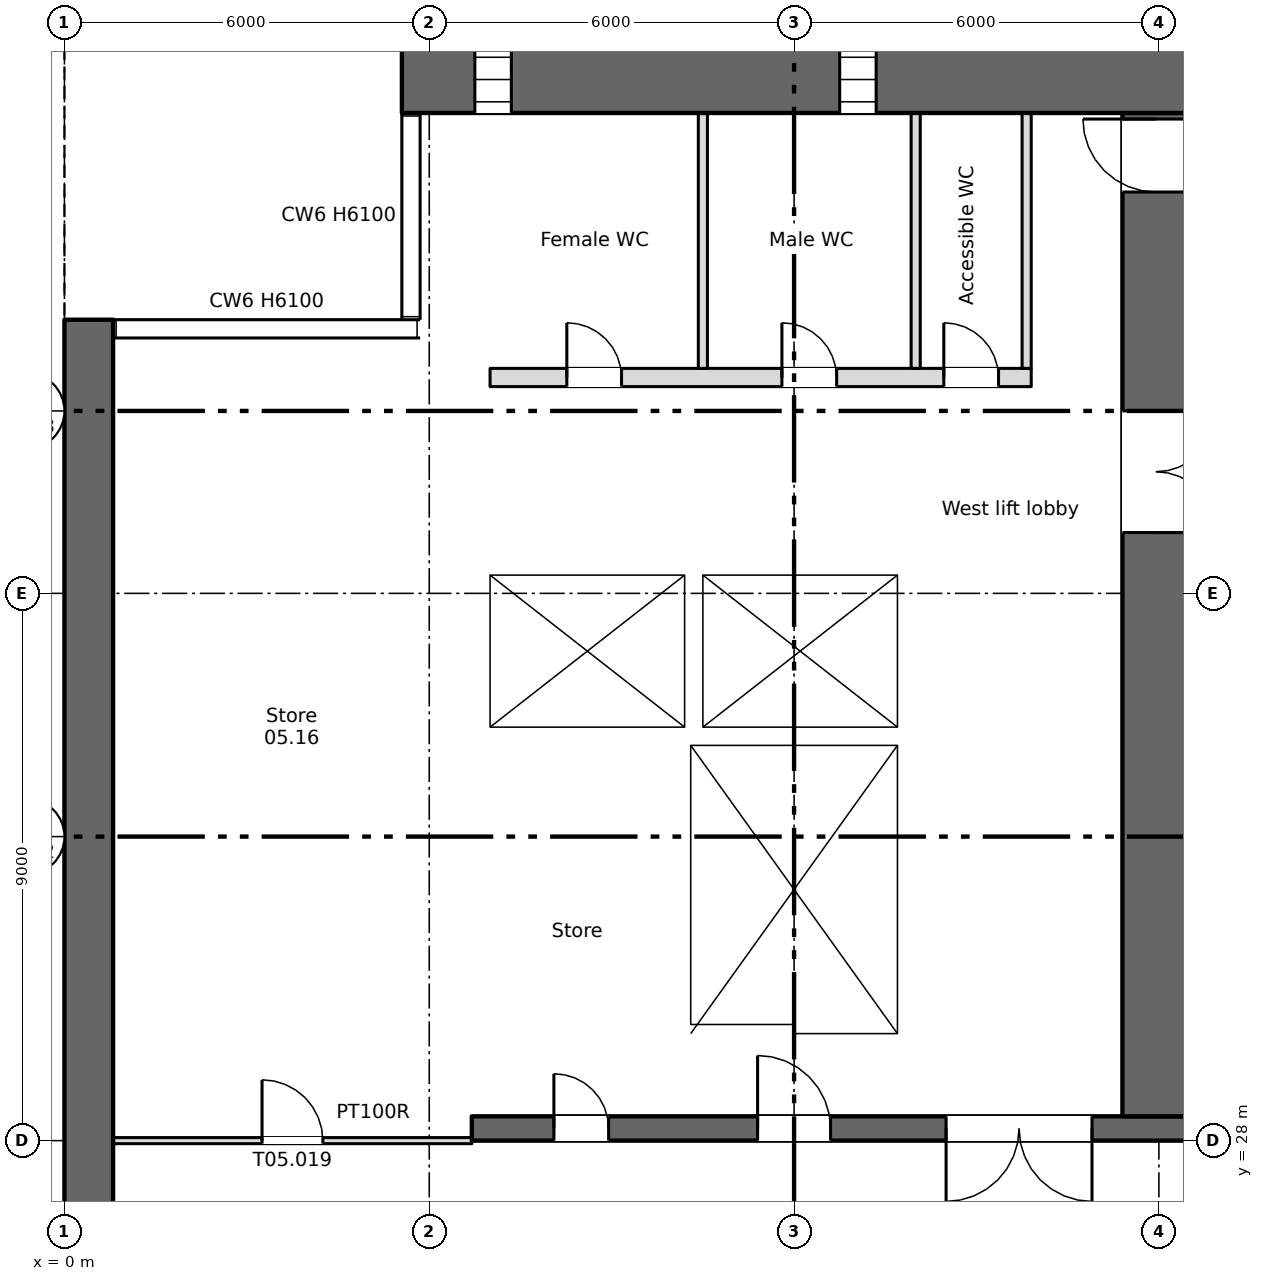
"""IFC4 building model, lengths in metres.
Left out: names, types, materials, properties, quantities, classifications, styles, units other than length and angle.
Written with IfcOpenShell. Run it as: python <this file> out.ifc"""

import sys

from ifc_helpers import new_model, si_unit, direction, frame, frame_2d, origin, place, context, subcontext, project, spatial, rectangle, extrude, element, fill, save


model = new_model("IFC4")
c1 = context("Model", 3, precision=1e-05, world=origin(), true_north=direction((0.0, 1.0)))
c2 = subcontext(c1, "Body", "Model", "MODEL_VIEW")
j1 = project(units=[si_unit("LENGTHUNIT", "METRE"), si_unit("PLANEANGLEUNIT", "RADIAN")], contexts=[c1])
p1 = place(None, origin())
s1 = spatial("IfcSite", under=j1, at=p1, CompositionType="ELEMENT")
p2 = place(p1, origin())
s2 = spatial("IfcBuilding", under=s1, at=p2, CompositionType="ELEMENT")
p3 = place(p2, frame((0.0, 0.0, 11.3)))
s3 = spatial("IfcBuildingStorey", under=s2, at=p3, CompositionType="ELEMENT", Elevation=11.3)
p4 = place(p3, frame((0.4, 4.5, 0.0), z_axis=(0.0, 0.0, 1.0), x_axis=(0.0, 1.0, 0.0)))
e1 = element("IfcWall", 1, at=p4, inside=s3, PredefinedType="SHEAR", context=c2, shape_type="SweptSolid", body=[
    extrude(rectangle(XDim=37.0, YDim=0.8, at=frame_2d((18.5, 0.0))), origin(), (0.0, 0.0, 1.0), 6.1),
])
p5 = place(p3, frame((5.55, 45.45, 0.0), z_axis=(0.0, 0.0, 1.0), x_axis=(1.0, 0.0, 0.0)))
e2 = element("IfcWall", 2, at=p5, inside=s3, PredefinedType="SHEAR", context=c2, shape_type="SweptSolid", body=[
    extrude(rectangle(XDim=66.9, YDim=1.1, at=frame_2d((33.45, 0.0))), origin(), (0.0, 0.0, 1.0), 6.1),
])
p6 = place(p5, frame((1.2, 0.0, 0.6)))
e3 = element("IfcOpeningElement", 3, at=p6, cuts=e2, PredefinedType="OPENING", context=c2, shape_type="SweptSolid", body=[
    extrude(rectangle(XDim=0.6, YDim=2.7, at=frame_2d((0.3, 1.35))), frame((0.0, 0.56, 0.0), z_axis=(0.0, -1.0, 0.0), x_axis=(1.0, 0.0, 0.0)), (0.0, 0.0, 1.0), 1.12),
])
p7 = place(p5, frame((7.2, 0.0, 0.6)))
e4 = element("IfcOpeningElement", 4, at=p7, cuts=e2, PredefinedType="OPENING", context=c2, shape_type="SweptSolid", body=[
    extrude(rectangle(XDim=0.6, YDim=2.7, at=frame_2d((0.3, 1.35))), frame((0.0, 0.56, 0.0), z_axis=(0.0, -1.0, 0.0), x_axis=(1.0, 0.0, 0.0)), (0.0, 0.0, 1.0), 1.12),
])
p8 = place(p5, frame((61.2, 0.0, 0.6)))
e5 = element("IfcOpeningElement", 5, at=p8, cuts=e2, PredefinedType="OPENING", context=c2, shape_type="SweptSolid", body=[
    extrude(rectangle(XDim=0.6, YDim=2.7, at=frame_2d((0.3, 1.35))), frame((0.0, 0.56, 0.0), z_axis=(0.0, -1.0, 0.0), x_axis=(1.0, 0.0, 0.0)), (0.0, 0.0, 1.0), 1.12),
])
p9 = place(p3, frame((6.7, 28.2, 0.0), z_axis=(0.0, 0.0, 1.0), x_axis=(1.0, 0.0, 0.0)))
e6 = element("IfcWall", 6, at=p9, inside=s3, PredefinedType="SHEAR", context=c2, shape_type="SweptSolid", body=[
    extrude(rectangle(XDim=66.3, YDim=0.4, at=frame_2d((33.15, 0.0))), origin(), (0.0, 0.0, 1.0), 6.1),
])
p10 = place(p9, frame((13.85, 0.0, 0.0)))
e7 = element("IfcOpeningElement", 7, at=p10, cuts=e6, PredefinedType="OPENING", context=c2, shape_type="SweptSolid", body=[
    extrude(rectangle(XDim=0.9, YDim=2.1, at=frame_2d((0.45, 1.05))), frame((0.0, 0.21, 0.0), z_axis=(0.0, -1.0, 0.0), x_axis=(1.0, 0.0, 0.0)), (0.0, 0.0, 1.0), 0.42),
])
p11 = place(p9, frame((48.562, 0.0, 0.0)))
e8 = element("IfcOpeningElement", 8, at=p11, cuts=e6, PredefinedType="OPENING", context=c2, shape_type="SweptSolid", body=[
    extrude(rectangle(XDim=0.9, YDim=2.1, at=frame_2d((0.45, 1.05))), frame((0.0, 0.21, 0.0), z_axis=(0.0, -1.0, 0.0), x_axis=(1.0, 0.0, 0.0)), (0.0, 0.0, 1.0), 0.42),
])
p12 = place(p9, frame((51.137, 0.0, 0.0)))
e9 = element("IfcOpeningElement", 9, at=p12, cuts=e6, PredefinedType="OPENING", context=c2, shape_type="SweptSolid", body=[
    extrude(rectangle(XDim=0.9, YDim=2.1, at=frame_2d((0.45, 1.05))), frame((0.0, 0.21, 0.0), z_axis=(0.0, -1.0, 0.0), x_axis=(1.0, 0.0, 0.0)), (0.0, 0.0, 1.0), 0.42),
])
p13 = place(p9, frame((1.35, 0.0, 0.0)))
e10 = element("IfcOpeningElement", 10, at=p13, cuts=e6, PredefinedType="OPENING", context=c2, shape_type="SweptSolid", body=[
    extrude(rectangle(XDim=0.9, YDim=2.1, at=frame_2d((0.45, 1.05))), frame((0.0, 0.21, 0.0), z_axis=(0.0, -1.0, 0.0), x_axis=(1.0, 0.0, 0.0)), (0.0, 0.0, 1.0), 0.42),
])
p14 = place(p9, frame((59.363, 0.0, 0.0)))
e11 = element("IfcOpeningElement", 11, at=p14, cuts=e6, PredefinedType="OPENING", context=c2, shape_type="SweptSolid", body=[
    extrude(rectangle(XDim=0.9, YDim=2.1, at=frame_2d((0.45, 1.05))), frame((0.0, 0.21, 0.0), z_axis=(0.0, -1.0, 0.0), x_axis=(1.0, 0.0, 0.0)), (0.0, 0.0, 1.0), 0.42),
])
p15 = place(p9, frame((63.538, 0.0, 0.0)))
e12 = element("IfcOpeningElement", 12, at=p15, cuts=e6, PredefinedType="OPENING", context=c2, shape_type="SweptSolid", body=[
    extrude(rectangle(XDim=0.9, YDim=2.1, at=frame_2d((0.45, 1.05))), frame((0.0, 0.21, 0.0), z_axis=(0.0, -1.0, 0.0), x_axis=(1.0, 0.0, 0.0)), (0.0, 0.0, 1.0), 0.42),
])
p16 = place(p9, frame((4.7, 0.0, 0.0)))
e13 = element("IfcOpeningElement", 13, at=p16, cuts=e6, PredefinedType="OPENING", context=c2, shape_type="SweptSolid", body=[
    extrude(rectangle(XDim=1.2, YDim=2.1, at=frame_2d((0.6, 1.05))), frame((0.0, 0.21, 0.0), z_axis=(0.0, -1.0, 0.0), x_axis=(1.0, 0.0, 0.0)), (0.0, 0.0, 1.0), 0.42),
])
p17 = place(p9, frame((31.7, 0.0, 0.0)))
e14 = element("IfcOpeningElement", 14, at=p17, cuts=e6, PredefinedType="OPENING", context=c2, shape_type="SweptSolid", body=[
    extrude(rectangle(XDim=1.2, YDim=2.1, at=frame_2d((0.6, 1.05))), frame((0.0, 0.21, 0.0), z_axis=(0.0, -1.0, 0.0), x_axis=(1.0, 0.0, 0.0)), (0.0, 0.0, 1.0), 0.42),
])
p18 = place(p9, frame((55.2, 0.0, 0.0)))
e15 = element("IfcOpeningElement", 15, at=p18, cuts=e6, PredefinedType="OPENING", context=c2, shape_type="SweptSolid", body=[
    extrude(rectangle(XDim=1.2, YDim=2.1, at=frame_2d((0.6, 1.05))), frame((0.0, 0.21, 0.0), z_axis=(0.0, -1.0, 0.0), x_axis=(1.0, 0.0, 0.0)), (0.0, 0.0, 1.0), 0.42),
])
p19 = place(p9, frame((21.7, 0.0, 0.0)))
e16 = element("IfcOpeningElement", 16, at=p19, cuts=e6, PredefinedType="OPENING", context=c2, shape_type="SweptSolid", body=[
    extrude(rectangle(XDim=1.2, YDim=2.1, at=frame_2d((0.6, 1.05))), frame((0.0, 0.21, 0.0), z_axis=(0.0, -1.0, 0.0), x_axis=(1.0, 0.0, 0.0)), (0.0, 0.0, 1.0), 0.42),
])
p20 = place(p9, frame((41.7, 0.0, 0.0)))
e17 = element("IfcOpeningElement", 17, at=p20, cuts=e6, PredefinedType="OPENING", context=c2, shape_type="SweptSolid", body=[
    extrude(rectangle(XDim=1.2, YDim=2.1, at=frame_2d((0.6, 1.05))), frame((0.0, 0.21, 0.0), z_axis=(0.0, -1.0, 0.0), x_axis=(1.0, 0.0, 0.0)), (0.0, 0.0, 1.0), 0.42),
])
p21 = place(p9, frame((24.85, 0.0, 0.0)))
e18 = element("IfcOpeningElement", 18, at=p21, cuts=e6, PredefinedType="OPENING", context=c2, shape_type="SweptSolid", body=[
    extrude(rectangle(XDim=2.4, YDim=2.1, at=frame_2d((1.2, 1.05))), frame((0.0, 0.21, 0.0), z_axis=(0.0, -1.0, 0.0), x_axis=(1.0, 0.0, 0.0)), (0.0, 0.0, 1.0), 0.42),
])
p22 = place(p9, frame((37.35, 0.0, 0.0)))
e19 = element("IfcOpeningElement", 19, at=p22, cuts=e6, PredefinedType="OPENING", context=c2, shape_type="SweptSolid", body=[
    extrude(rectangle(XDim=2.4, YDim=2.1, at=frame_2d((1.2, 1.05))), frame((0.0, 0.21, 0.0), z_axis=(0.0, -1.0, 0.0), x_axis=(1.0, 0.0, 0.0)), (0.0, 0.0, 1.0), 0.42),
])
p23 = place(p9, frame((7.8, 0.0, 0.0)))
e20 = element("IfcOpeningElement", 20, at=p23, cuts=e6, PredefinedType="OPENING", context=c2, shape_type="SweptSolid", body=[
    extrude(rectangle(XDim=2.4, YDim=2.1, at=frame_2d((1.2, 1.05))), frame((0.0, 0.21, 0.0), z_axis=(0.0, -1.0, 0.0), x_axis=(1.0, 0.0, 0.0)), (0.0, 0.0, 1.0), 0.42),
])
p24 = place(p9, frame((28.85, 0.0, 0.0)))
e21 = element("IfcOpeningElement", 21, at=p24, cuts=e6, PredefinedType="OPENING", context=c2, shape_type="SweptSolid", body=[
    extrude(rectangle(XDim=0.9, YDim=2.1, at=frame_2d((0.45, 1.05))), frame((0.0, 0.21, 0.0), z_axis=(0.0, -1.0, 0.0), x_axis=(1.0, 0.0, 0.0)), (0.0, 0.0, 1.0), 0.42),
])
p25 = place(p9, frame((34.85, 0.0, 0.0)))
e22 = element("IfcOpeningElement", 22, at=p25, cuts=e6, PredefinedType="OPENING", context=c2, shape_type="SweptSolid", body=[
    extrude(rectangle(XDim=0.9, YDim=2.1, at=frame_2d((0.45, 1.05))), frame((0.0, 0.21, 0.0), z_axis=(0.0, -1.0, 0.0), x_axis=(1.0, 0.0, 0.0)), (0.0, 0.0, 1.0), 0.42),
])
p26 = place(p3, frame((6.85, 28.4, 0.0), z_axis=(0.0, 0.0, 1.0), x_axis=(0.0, 1.0, 0.0)))
e23 = element("IfcWall", 23, at=p26, inside=s3, PredefinedType="SHEAR", context=c2, shape_type="SweptSolid", body=[
    extrude(rectangle(XDim=16.5, YDim=0.3, at=frame_2d((8.25, 0.0))), origin(), (0.0, 0.0, 1.0), 6.1),
])
p27 = place(p3, frame((17.95, 28.4, 0.0), z_axis=(0.0, 0.0, 1.0), x_axis=(0.0, 1.0, 0.0)))
e24 = element("IfcWall", 24, at=p27, inside=s3, PredefinedType="SHEAR", context=c2, shape_type="SweptSolid", body=[
    extrude(rectangle(XDim=16.5, YDim=1.1, at=frame_2d((8.25, 0.0))), origin(), (0.0, 0.0, 1.0), 6.1),
])
p28 = place(p27, frame((9.6, 0.0, 0.0)))
e25 = element("IfcOpeningElement", 25, at=p28, cuts=e24, PredefinedType="OPENING", context=c2, shape_type="SweptSolid", body=[
    extrude(rectangle(XDim=2.0, YDim=2.1, at=frame_2d((1.0, 1.05))), frame((0.0, 0.56, 0.0), z_axis=(0.0, -1.0, 0.0), x_axis=(1.0, 0.0, 0.0)), (0.0, 0.0, 1.0), 1.12),
])
p29 = place(p27, frame((15.2, 0.0, 0.0)))
e26 = element("IfcOpeningElement", 26, at=p29, cuts=e24, PredefinedType="OPENING", context=c2, shape_type="SweptSolid", body=[
    extrude(rectangle(XDim=1.2, YDim=2.1, at=frame_2d((0.6, 1.05))), frame((0.0, 0.56, 0.0), z_axis=(0.0, -1.0, 0.0), x_axis=(1.0, 0.0, 0.0)), (0.0, 0.0, 1.0), 1.12),
])
for number, where, z_axis, x_axis in (
    (27, (10.15, 28.4, 0.0), (0.0, 0.0, 1.0), (0.0, 1.0, 0.0)),
    (28, (13.85, 28.4, 0.0), (0.0, 0.0, 1.0), (0.0, 1.0, 0.0)),
):
    element("IfcWall", number, at=place(p3, frame(where, z_axis=z_axis, x_axis=x_axis)), inside=s3, PredefinedType="SHEAR", context=c2, shape_type="SweptSolid", body=[
        extrude(rectangle(XDim=6.1, YDim=0.3, at=frame_2d((3.05, 0.0))), origin(), (0.0, 0.0, 1.0), 6.1),
    ])
for number, where, z_axis, x_axis in (
    (29, (7.0, 34.65, 0.0), (0.0, 0.0, 1.0), (1.0, 0.0, 0.0)),
    (30, (7.0, 37.45, 0.0), (0.0, 0.0, 1.0), (1.0, 0.0, 0.0)),
):
    element("IfcWall", number, at=place(p3, frame(where, z_axis=z_axis, x_axis=x_axis)), inside=s3, PredefinedType="SHEAR", context=c2, shape_type="SweptSolid", body=[
        extrude(rectangle(XDim=7.0, YDim=0.3, at=frame_2d((3.5, 0.0))), origin(), (0.0, 0.0, 1.0), 6.1),
    ])
p30 = place(p3, frame((13.85, 34.8, 0.0), z_axis=(0.0, 0.0, 1.0), x_axis=(0.0, 1.0, 0.0)))
e31 = element("IfcWall", 31, at=p30, inside=s3, PredefinedType="SHEAR", context=c2, shape_type="SweptSolid", body=[
    extrude(rectangle(XDim=2.5, YDim=0.3, at=frame_2d((1.25, 0.0))), origin(), (0.0, 0.0, 1.0), 6.1),
])
p31 = place(p3, frame((7.0, 40.55, 0.0), z_axis=(0.0, 0.0, 1.0), x_axis=(1.0, 0.0, 0.0)))
e32 = element("IfcWall", 32, at=p31, inside=s3, PredefinedType="PARTITIONING", context=c2, shape_type="SweptSolid", body=[
    extrude(rectangle(XDim=8.9, YDim=0.3, at=frame_2d((4.45, 0.0))), origin(), (0.0, 0.0, 1.0), 6.1),
])
p32 = place(p31, frame((1.262, 0.0, 0.0)))
e33 = element("IfcOpeningElement", 33, at=p32, cuts=e32, PredefinedType="OPENING", context=c2, shape_type="SweptSolid", body=[
    extrude(rectangle(XDim=0.9, YDim=2.1, at=frame_2d((0.45, 1.05))), frame((0.0, 0.16, 0.0), z_axis=(0.0, -1.0, 0.0), x_axis=(1.0, 0.0, 0.0)), (0.0, 0.0, 1.0), 0.32),
])
p33 = place(p31, frame((4.8, 0.0, 0.0)))
e34 = element("IfcOpeningElement", 34, at=p33, cuts=e32, PredefinedType="OPENING", context=c2, shape_type="SweptSolid", body=[
    extrude(rectangle(XDim=0.9, YDim=2.1, at=frame_2d((0.45, 1.05))), frame((0.0, 0.16, 0.0), z_axis=(0.0, -1.0, 0.0), x_axis=(1.0, 0.0, 0.0)), (0.0, 0.0, 1.0), 0.32),
])
p34 = place(p31, frame((7.462, 0.0, 0.0)))
e35 = element("IfcOpeningElement", 35, at=p34, cuts=e32, PredefinedType="OPENING", context=c2, shape_type="SweptSolid", body=[
    extrude(rectangle(XDim=0.9, YDim=2.1, at=frame_2d((0.45, 1.05))), frame((0.0, 0.16, 0.0), z_axis=(0.0, -1.0, 0.0), x_axis=(1.0, 0.0, 0.0)), (0.0, 0.0, 1.0), 0.32),
])
p35 = place(p3, frame((10.35, 34.8, 0.0), z_axis=(0.0, 0.0, 1.0), x_axis=(0.0, 1.0, 0.0)))
e36 = element("IfcWall", 36, at=p35, inside=s3, PredefinedType="SHEAR", context=c2, shape_type="SweptSolid", body=[
    extrude(rectangle(XDim=2.5, YDim=0.3, at=frame_2d((1.25, 0.0))), origin(), (0.0, 0.0, 1.0), 6.1),
])
for number, where, z_axis, x_axis in (
    (37, (15.825, 40.7, 0.0), (0.0, 0.0, 1.0), (0.0, 1.0, 0.0)),
    (38, (10.5, 40.7, 0.0), (0.0, 0.0, 1.0), (0.0, 1.0, 0.0)),
    (39, (14.0, 40.7, 0.0), (0.0, 0.0, 1.0), (0.0, 1.0, 0.0)),
):
    element("IfcWall", number, at=place(p3, frame(where, z_axis=z_axis, x_axis=x_axis)), inside=s3, PredefinedType="PARTITIONING", context=c2, shape_type="SweptSolid", body=[
        extrude(rectangle(XDim=4.2, YDim=0.15, at=frame_2d((2.1, 0.0))), origin(), (0.0, 0.0, 1.0), 6.1),
    ])
p36 = place(p3, frame((0.8, 28.0, 0.0), z_axis=(0.0, 0.0, 1.0), x_axis=(1.0, 0.0, 0.0)))
e40 = element("IfcWall", 40, at=p36, inside=s3, PredefinedType="PARTITIONING", context=c2, shape_type="SweptSolid", body=[
    extrude(rectangle(XDim=5.9, YDim=0.1, at=frame_2d((2.95, 0.0))), origin(), (0.0, 0.0, 1.0), 6.1),
])
p37 = place(p36, frame((2.45, 0.0, 0.0)))
e41 = element("IfcOpeningElement", 41, at=p37, cuts=e40, PredefinedType="OPENING", context=c2, shape_type="SweptSolid", body=[
    extrude(rectangle(XDim=1.0, YDim=2.1, at=frame_2d((0.5, 1.05))), frame((0.0, 0.06, 0.0), z_axis=(0.0, -1.0, 0.0), x_axis=(1.0, 0.0, 0.0)), (0.0, 0.0, 1.0), 0.12),
])
p38 = place(p6, origin())
e42 = element("IfcWindow", 42, at=p38, inside=s3, PartitioningType="SINGLE_PANEL", PredefinedType="WINDOW", context=c2, shape_type="SweptSolid", body=[
    extrude(rectangle(XDim=0.6, YDim=2.7, at=frame_2d((0.3, 1.35))), frame((0.0, 0.03, 0.0), z_axis=(0.0, -1.0, 0.0), x_axis=(1.0, 0.0, 0.0)), (0.0, 0.0, 1.0), 0.06),
])
fill(e3, e42)
p39 = place(p7, origin())
e43 = element("IfcWindow", 43, at=p39, inside=s3, PartitioningType="SINGLE_PANEL", PredefinedType="WINDOW", context=c2, shape_type="SweptSolid", body=[
    extrude(rectangle(XDim=0.6, YDim=2.7, at=frame_2d((0.3, 1.35))), frame((0.0, 0.03, 0.0), z_axis=(0.0, -1.0, 0.0), x_axis=(1.0, 0.0, 0.0)), (0.0, 0.0, 1.0), 0.06),
])
fill(e4, e43)
p40 = place(p13, origin())
e44 = element("IfcDoor", 44, at=p40, inside=s3, OperationType="SINGLE_SWING_LEFT", PredefinedType="DOOR", context=c2, shape_type="SweptSolid", body=[
    extrude(rectangle(XDim=0.9, YDim=2.1, at=frame_2d((0.45, 1.05))), frame((0.0, 0.025, 0.0), z_axis=(0.0, -1.0, 0.0), x_axis=(1.0, 0.0, 0.0)), (0.0, 0.0, 1.0), 0.05),
])
fill(e10, e44)
p41 = place(p32, origin())
e45 = element("IfcDoor", 45, at=p41, inside=s3, OperationType="SINGLE_SWING_LEFT", PredefinedType="DOOR", context=c2, shape_type="SweptSolid", body=[
    extrude(rectangle(XDim=0.9, YDim=2.1, at=frame_2d((0.45, 1.05))), frame((0.0, 0.025, 0.0), z_axis=(0.0, -1.0, 0.0), x_axis=(1.0, 0.0, 0.0)), (0.0, 0.0, 1.0), 0.05),
])
fill(e33, e45)
p42 = place(p33, origin())
e46 = element("IfcDoor", 46, at=p42, inside=s3, OperationType="SINGLE_SWING_LEFT", PredefinedType="DOOR", context=c2, shape_type="SweptSolid", body=[
    extrude(rectangle(XDim=0.9, YDim=2.1, at=frame_2d((0.45, 1.05))), frame((0.0, 0.025, 0.0), z_axis=(0.0, -1.0, 0.0), x_axis=(1.0, 0.0, 0.0)), (0.0, 0.0, 1.0), 0.05),
])
fill(e34, e46)
p43 = place(p34, origin())
e47 = element("IfcDoor", 47, at=p43, inside=s3, OperationType="SINGLE_SWING_LEFT", PredefinedType="DOOR", context=c2, shape_type="SweptSolid", body=[
    extrude(rectangle(XDim=0.9, YDim=2.1, at=frame_2d((0.45, 1.05))), frame((0.0, 0.025, 0.0), z_axis=(0.0, -1.0, 0.0), x_axis=(1.0, 0.0, 0.0)), (0.0, 0.0, 1.0), 0.05),
])
fill(e35, e47)
p44 = place(p16, origin())
e48 = element("IfcDoor", 48, at=p44, inside=s3, OperationType="SINGLE_SWING_LEFT", PredefinedType="DOOR", context=c2, shape_type="SweptSolid", body=[
    extrude(rectangle(XDim=1.2, YDim=2.1, at=frame_2d((0.6, 1.05))), frame((0.0, 0.025, 0.0), z_axis=(0.0, -1.0, 0.0), x_axis=(1.0, 0.0, 0.0)), (0.0, 0.0, 1.0), 0.05),
])
fill(e13, e48)
p45 = place(p23, origin())
e49 = element("IfcDoor", 49, at=p45, inside=s3, OperationType="DOUBLE_DOOR_SINGLE_SWING", PredefinedType="DOOR", context=c2, shape_type="SweptSolid", body=[
    extrude(rectangle(XDim=2.4, YDim=2.1, at=frame_2d((1.2, 1.05))), frame((0.0, 0.025, 0.0), z_axis=(0.0, -1.0, 0.0), x_axis=(1.0, 0.0, 0.0)), (0.0, 0.0, 1.0), 0.05),
])
fill(e20, e49)
p46 = place(p28, origin())
e50 = element("IfcDoor", 50, at=p46, inside=s3, OperationType="DOUBLE_DOOR_SINGLE_SWING", PredefinedType="DOOR", context=c2, shape_type="SweptSolid", body=[
    extrude(rectangle(XDim=2.0, YDim=2.1, at=frame_2d((1.0, 1.05))), frame((0.0, 0.025, 0.0), z_axis=(0.0, -1.0, 0.0), x_axis=(1.0, 0.0, 0.0)), (0.0, 0.0, 1.0), 0.05),
])
fill(e25, e50)
p47 = place(p29, origin())
e51 = element("IfcDoor", 51, at=p47, inside=s3, OperationType="SINGLE_SWING_RIGHT", PredefinedType="DOOR", context=c2, shape_type="SweptSolid", body=[
    extrude(rectangle(XDim=1.2, YDim=2.1, at=frame_2d((0.6, 1.05))), frame((0.0, 0.025, 0.0), z_axis=(0.0, -1.0, 0.0), x_axis=(1.0, 0.0, 0.0)), (0.0, 0.0, 1.0), 0.05),
])
fill(e26, e51)
p48 = place(p37, origin())
e52 = element("IfcDoor", 52, at=p48, inside=s3, OperationType="SINGLE_SWING_LEFT", PredefinedType="DOOR", context=c2, shape_type="SweptSolid", body=[
    extrude(rectangle(XDim=1.0, YDim=2.1, at=frame_2d((0.5, 1.05))), frame((0.0, 0.025, 0.0), z_axis=(0.0, -1.0, 0.0), x_axis=(1.0, 0.0, 0.0)), (0.0, 0.0, 1.0), 0.05),
])
fill(e41, e52)
save(model, sys.argv[1])
